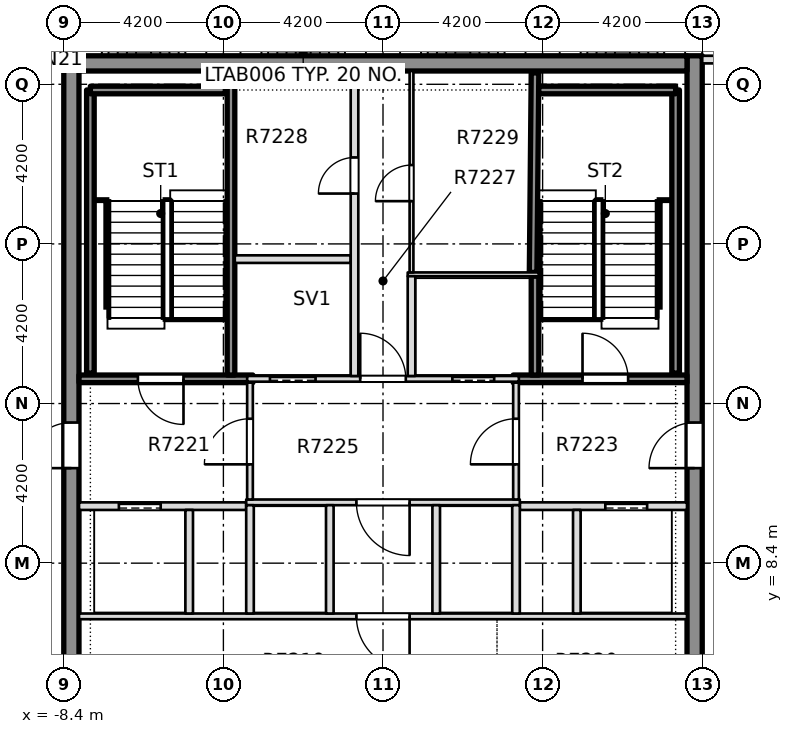
"""IFC4 building model, lengths in metres.
Left out: names, types, materials, properties, quantities, classifications, styles, units other than length and angle.
Written with IfcOpenShell. Run it as: python <this file> out.ifc"""

import sys

from ifc_helpers import new_model, si_unit, direction, frame, frame_2d, origin, place, context, subcontext, project, spatial, rectangle, extrude, element, fill, save


model = new_model("IFC4")
c1 = context("Model", 3, precision=1e-05, world=origin(), true_north=direction((0.0, 1.0)))
c2 = subcontext(c1, "Body", "Model", "MODEL_VIEW")
j1 = project(units=[si_unit("LENGTHUNIT", "METRE"), si_unit("PLANEANGLEUNIT", "RADIAN")], contexts=[c1])
p1 = place(None, origin())
s1 = spatial("IfcSite", under=j1, at=p1, CompositionType="ELEMENT")
p2 = place(p1, origin())
s2 = spatial("IfcBuilding", under=s1, at=p2, CompositionType="ELEMENT")
p3 = place(p2, frame((0.0, 0.0, 273.85)))
s3 = spatial("IfcBuildingStorey", under=s2, at=p3, CompositionType="ELEMENT", Elevation=273.85)
p4 = place(p3, frame((8.2, 4.2, -0.5), z_axis=(0.0, 0.0, 1.0), x_axis=(0.0, 1.0, 0.0)))
e1 = element("IfcWall", 1, at=p4, inside=s3, PredefinedType="SHEAR", context=c2, shape_type="SweptSolid", body=[
    extrude(rectangle(XDim=17.55, YDim=0.4, at=frame_2d((8.775, 0.0))), origin(), (0.0, 0.0, 1.0), 4.5),
])
p5 = place(p4, frame((6.7, 0.0, 0.5)))
e2 = element("IfcOpeningElement", 2, at=p5, cuts=e1, PredefinedType="OPENING", context=c2, shape_type="SweptSolid", body=[
    extrude(rectangle(XDim=1.2, YDim=2.1, at=frame_2d((0.6, 1.05))), frame((0.0, 0.21, 0.0), z_axis=(0.0, -1.0, 0.0), x_axis=(1.0, 0.0, 0.0)), (0.0, 0.0, 1.0), 0.42),
])
p6 = place(p3, frame((-8.2, 4.2, -0.5), z_axis=(0.0, 0.0, 1.0), x_axis=(0.0, 1.0, 0.0)))
e3 = element("IfcWall", 3, at=p6, inside=s3, PredefinedType="SHEAR", context=c2, shape_type="SweptSolid", body=[
    extrude(rectangle(XDim=17.55, YDim=0.4, at=frame_2d((8.775, 0.0))), origin(), (0.0, 0.0, 1.0), 4.5),
])
p7 = place(p6, frame((6.7, 0.0, 0.5)))
e4 = element("IfcOpeningElement", 4, at=p7, cuts=e3, PredefinedType="OPENING", context=c2, shape_type="SweptSolid", body=[
    extrude(rectangle(XDim=1.2, YDim=2.1, at=frame_2d((0.6, 1.05))), frame((0.0, 0.21, 0.0), z_axis=(0.0, -1.0, 0.0), x_axis=(1.0, 0.0, 0.0)), (0.0, 0.0, 1.0), 0.42),
])
p8 = place(p3, frame((-8.0, 21.55, -0.5), z_axis=(0.0, 0.0, 1.0), x_axis=(1.0, 0.0, 0.0)))
e5 = element("IfcWall", 5, at=p8, inside=s3, PredefinedType="SHEAR", context=c2, shape_type="SweptSolid", body=[
    extrude(rectangle(XDim=16.0, YDim=0.4, at=frame_2d((8.0, 0.0))), origin(), (0.0, 0.0, 1.0), 4.5),
])
for number, where, z_axis, x_axis in (
    (6, (9.6, 21.65, 0.0), (0.0, 0.0, 1.0), (-1.0, 0.0, 0.0)),
    (7, (-8.4, 21.65, 0.0), (0.0, 0.0, 1.0), (-1.0, 0.0, 0.0)),
):
    element("IfcWall", number, at=place(p3, frame(where, z_axis=z_axis, x_axis=x_axis)), inside=s3, PredefinedType="STANDARD", context=c2, shape_type="SweptSolid", body=[
        extrude(rectangle(XDim=1.2, YDim=0.2, at=frame_2d((0.6, 0.0))), origin(), (0.0, 0.0, 1.0), 4.0),
    ])
p9 = place(p3, frame((-7.999, 7.0, 0.0), z_axis=(0.0, 0.0, 1.0), x_axis=(1.0, 0.0, 0.0)))
e8 = element("IfcWall", 8, at=p9, inside=s3, PredefinedType="PARTITIONING", context=c2, shape_type="SweptSolid", body=[
    extrude(rectangle(XDim=15.998, YDim=0.15, at=frame_2d((7.999, 0.0))), origin(), (0.0, 0.0, 1.0), 4.0),
])
p10 = place(p9, frame((7.299, 0.0, 0.0)))
e9 = element("IfcOpeningElement", 9, at=p10, cuts=e8, PredefinedType="OPENING", context=c2, shape_type="SweptSolid", body=[
    extrude(rectangle(XDim=1.4, YDim=2.1, at=frame_2d((0.7, 1.05))), frame((0.0, 0.085, 0.0), z_axis=(0.0, -1.0, 0.0), x_axis=(1.0, 0.0, 0.0)), (0.0, 0.0, 1.0), 0.17),
])
p11 = place(p3, frame((-7.999, 9.9, 0.0), z_axis=(0.0, 0.0, 1.0), x_axis=(1.0, 0.0, 0.0)))
e10 = element("IfcWall", 10, at=p11, inside=s3, PredefinedType="PARTITIONING", context=c2, shape_type="SweptSolid", body=[
    extrude(rectangle(XDim=4.399, YDim=0.2, at=frame_2d((2.199, 0.0))), origin(), (0.0, 0.0, 1.0), 4.0),
])
p12 = place(p11, frame((1.049, 0.0, 0.0)))
e11 = element("IfcOpeningElement", 11, at=p12, cuts=e10, PredefinedType="OPENING", context=c2, shape_type="SweptSolid", body=[
    extrude(rectangle(XDim=1.1, YDim=2.1, at=frame_2d((0.55, 1.05))), frame((0.0, 0.11, 0.0), z_axis=(0.0, -1.0, 0.0), x_axis=(1.0, 0.0, 0.0)), (0.0, 0.0, 1.0), 0.22),
])
p13 = place(p3, frame((3.6, 9.9, 0.0), z_axis=(0.0, 0.0, 1.0), x_axis=(1.0, 0.0, 0.0)))
e12 = element("IfcWall", 12, at=p13, inside=s3, PredefinedType="PARTITIONING", context=c2, shape_type="SweptSolid", body=[
    extrude(rectangle(XDim=4.399, YDim=0.2, at=frame_2d((2.199, 0.0))), origin(), (0.0, 0.0, 1.0), 4.0),
])
p14 = place(p13, frame((2.25, 0.0, 0.0)))
e13 = element("IfcOpeningElement", 13, at=p14, cuts=e12, PredefinedType="OPENING", context=c2, shape_type="SweptSolid", body=[
    extrude(rectangle(XDim=1.1, YDim=2.1, at=frame_2d((0.55, 1.05))), frame((0.0, 0.11, 0.0), z_axis=(0.0, -1.0, 0.0), x_axis=(1.0, 0.0, 0.0)), (0.0, 0.0, 1.0), 0.22),
])
p15 = place(p3, frame((-3.6, 10.0, 0.0), z_axis=(0.0, 0.0, 1.0), x_axis=(1.0, 0.0, 0.0)))
e14 = element("IfcWall", 14, at=p15, inside=s3, PredefinedType="PARTITIONING", context=c2, shape_type="SweptSolid", body=[
    extrude(rectangle(XDim=7.2, YDim=0.15, at=frame_2d((3.6, 0.0))), origin(), (0.0, 0.0, 1.0), 4.0),
])
p16 = place(p15, frame((2.9, 0.0, 0.0)))
e15 = element("IfcOpeningElement", 15, at=p16, cuts=e14, PredefinedType="OPENING", context=c2, shape_type="SweptSolid", body=[
    extrude(rectangle(XDim=1.4, YDim=2.1, at=frame_2d((0.7, 1.05))), frame((0.0, 0.085, 0.0), z_axis=(0.0, -1.0, 0.0), x_axis=(1.0, 0.0, 0.0)), (0.0, 0.0, 1.0), 0.17),
])
p17 = place(p3, frame((-7.999, 13.25, 0.0), z_axis=(0.0, 0.0, 1.0), x_axis=(1.0, 0.0, 0.0)))
e16 = element("IfcWall", 16, at=p17, inside=s3, PredefinedType="SOLIDWALL", context=c2, shape_type="SweptSolid", body=[
    extrude(rectangle(XDim=4.574, YDim=0.2, at=frame_2d((2.287, 0.0))), origin(), (0.0, 0.0, 1.0), 4.0),
])
p18 = place(p17, frame((1.549, 0.0, 0.0)))
e17 = element("IfcOpeningElement", 17, at=p18, cuts=e16, PredefinedType="OPENING", context=c2, shape_type="SweptSolid", body=[
    extrude(rectangle(XDim=1.2, YDim=2.1, at=frame_2d((0.6, 1.05))), frame((0.0, 0.11, 0.0), z_axis=(0.0, -1.0, 0.0), x_axis=(1.0, 0.0, 0.0)), (0.0, 0.0, 1.0), 0.22),
])
p19 = place(p3, frame((-3.575, 13.25, 0.0), z_axis=(0.0, 0.0, 1.0), x_axis=(1.0, 0.0, 0.0)))
e18 = element("IfcWall", 18, at=p19, inside=s3, PredefinedType="PARTITIONING", context=c2, shape_type="SweptSolid", body=[
    extrude(rectangle(XDim=7.15, YDim=0.15, at=frame_2d((3.575, 0.0))), origin(), (0.0, 0.0, 1.0), 4.0),
])
p20 = place(p19, frame((0.6, 0.0, 0.0)))
e19 = element("IfcOpeningElement", 19, at=p20, cuts=e18, PredefinedType="OPENING", context=c2, shape_type="SweptSolid", body=[
    extrude(rectangle(XDim=1.2, YDim=2.1, at=frame_2d((0.6, 1.05))), frame((0.0, 0.085, 0.0), z_axis=(0.0, -1.0, 0.0), x_axis=(1.0, 0.0, 0.0)), (0.0, 0.0, 1.0), 0.17),
])
p21 = place(p19, frame((5.4, 0.0, 0.0)))
e20 = element("IfcOpeningElement", 20, at=p21, cuts=e18, PredefinedType="OPENING", context=c2, shape_type="SweptSolid", body=[
    extrude(rectangle(XDim=1.1, YDim=2.1, at=frame_2d((0.55, 1.05))), frame((0.0, 0.085, 0.0), z_axis=(0.0, -1.0, 0.0), x_axis=(1.0, 0.0, 0.0)), (0.0, 0.0, 1.0), 0.17),
])
p22 = place(p19, frame((2.975, 0.0, 0.0)))
e21 = element("IfcOpeningElement", 21, at=p22, cuts=e18, PredefinedType="OPENING", context=c2, shape_type="SweptSolid", body=[
    extrude(rectangle(XDim=1.2, YDim=2.1, at=frame_2d((0.6, 1.05))), frame((0.0, 0.085, 0.0), z_axis=(0.0, -1.0, 0.0), x_axis=(1.0, 0.0, 0.0)), (0.0, 0.0, 1.0), 0.17),
])
p23 = place(p3, frame((3.425, 13.25, 0.0), z_axis=(0.0, 0.0, 1.0), x_axis=(1.0, 0.0, 0.0)))
e22 = element("IfcWall", 22, at=p23, inside=s3, PredefinedType="SOLIDWALL", context=c2, shape_type="SweptSolid", body=[
    extrude(rectangle(XDim=4.574, YDim=0.2, at=frame_2d((2.287, 0.0))), origin(), (0.0, 0.0, 1.0), 4.0),
])
p24 = place(p23, frame((1.825, 0.0, 0.0)))
e23 = element("IfcOpeningElement", 23, at=p24, cuts=e22, PredefinedType="OPENING", context=c2, shape_type="SweptSolid", body=[
    extrude(rectangle(XDim=1.2, YDim=2.1, at=frame_2d((0.6, 1.05))), frame((0.0, 0.11, 0.0), z_axis=(0.0, -1.0, 0.0), x_axis=(1.0, 0.0, 0.0)), (0.0, 0.0, 1.0), 0.22),
])
p25 = place(p3, frame((0.65, 16.0, 0.0), z_axis=(0.0, 0.0, 1.0), x_axis=(1.0, 0.0, 0.0)))
e24 = element("IfcWall", 24, at=p25, inside=s3, PredefinedType="PARTITIONING", context=c2, shape_type="SweptSolid", body=[
    extrude(rectangle(XDim=3.45, YDim=0.1, at=frame_2d((1.725, 0.0))), origin(), (0.0, 0.0, 1.0), 4.0),
])
p26 = place(p3, frame((-3.9, 16.4, 0.0), z_axis=(0.0, 0.0, 1.0), x_axis=(1.0, 0.0, 0.0)))
e25 = element("IfcWall", 25, at=p26, inside=s3, PredefinedType="PARTITIONING", context=c2, shape_type="SweptSolid", body=[
    extrude(rectangle(XDim=3.05, YDim=0.2, at=frame_2d((1.525, 0.0))), origin(), (0.0, 0.0, 1.0), 4.0),
])
p27 = place(p3, frame((-5.1, 7.075, 0.0), z_axis=(0.0, 0.0, 1.0), x_axis=(0.0, 1.0, 0.0)))
e26 = element("IfcWall", 26, at=p27, inside=s3, PredefinedType="PARTITIONING", context=c2, shape_type="SweptSolid", body=[
    extrude(rectangle(XDim=2.725, YDim=0.2, at=frame_2d((1.363, 0.0))), origin(), (0.0, 0.0, 1.0), 4.0),
])
p28 = place(p3, frame((-4.0, 13.35, 0.0), z_axis=(0.0, 0.0, 1.0), x_axis=(0.0, 1.0, 0.0)))
e27 = element("IfcWall", 27, at=p28, inside=s3, PredefinedType="SOLIDWALL", context=c2, shape_type="SweptSolid", body=[
    extrude(rectangle(XDim=7.999, YDim=0.2, at=frame_2d((4.0, 0.0))), origin(), (0.0, 0.0, 1.0), 4.0),
])
p29 = place(p3, frame((-3.5, 7.075, 0.0), z_axis=(0.0, 0.0, 1.0), x_axis=(0.0, 1.0, 0.0)))
e28 = element("IfcWall", 28, at=p29, inside=s3, PredefinedType="PARTITIONING", context=c2, shape_type="SweptSolid", body=[
    extrude(rectangle(XDim=2.85, YDim=0.2, at=frame_2d((1.425, 0.0))), origin(), (0.0, 0.0, 1.0), 4.0),
])
p30 = place(p3, frame((-3.5, 10.075, 0.0), z_axis=(0.0, 0.0, 1.0), x_axis=(0.0, 1.0, 0.0)))
e29 = element("IfcWall", 29, at=p30, inside=s3, PredefinedType="PARTITIONING", context=c2, shape_type="SweptSolid", body=[
    extrude(rectangle(XDim=3.075, YDim=0.15, at=frame_2d((1.538, 0.0))), origin(), (0.0, 0.0, 1.0), 4.0),
])
p31 = place(p30, frame((0.925, 0.0, 0.0)))
e30 = element("IfcOpeningElement", 30, at=p31, cuts=e29, PredefinedType="OPENING", context=c2, shape_type="SweptSolid", body=[
    extrude(rectangle(XDim=1.2, YDim=2.1, at=frame_2d((0.6, 1.05))), frame((0.0, 0.085, 0.0), z_axis=(0.0, -1.0, 0.0), x_axis=(1.0, 0.0, 0.0)), (0.0, 0.0, 1.0), 0.17),
])
p32 = place(p3, frame((-1.4, 7.075, 0.0), z_axis=(0.0, 0.0, 1.0), x_axis=(0.0, 1.0, 0.0)))
e31 = element("IfcWall", 31, at=p32, inside=s3, PredefinedType="PARTITIONING", context=c2, shape_type="SweptSolid", body=[
    extrude(rectangle(XDim=2.85, YDim=0.2, at=frame_2d((1.425, 0.0))), origin(), (0.0, 0.0, 1.0), 4.0),
])
p33 = place(p3, frame((-0.75, 13.325, 0.0), z_axis=(0.0, 0.0, 1.0), x_axis=(0.0, 1.0, 0.0)))
e32 = element("IfcWall", 32, at=p33, inside=s3, PredefinedType="PARTITIONING", context=c2, shape_type="SweptSolid", body=[
    extrude(rectangle(XDim=8.024, YDim=0.2, at=frame_2d((4.012, 0.0))), origin(), (0.0, 0.0, 1.0), 4.0),
])
p34 = place(p33, frame((4.8, 0.0, 0.0)))
e33 = element("IfcOpeningElement", 33, at=p34, cuts=e32, PredefinedType="OPENING", context=c2, shape_type="SweptSolid", body=[
    extrude(rectangle(XDim=0.95, YDim=2.1, at=frame_2d((0.475, 1.05))), frame((0.0, 0.11, 0.0), z_axis=(0.0, -1.0, 0.0), x_axis=(1.0, 0.0, 0.0)), (0.0, 0.0, 1.0), 0.22),
])
p35 = place(p3, frame((0.75, 13.325, 0.0), z_axis=(0.0, 0.0, 1.0), x_axis=(0.0, 1.0, 0.0)))
e34 = element("IfcWall", 34, at=p35, inside=s3, PredefinedType="PARTITIONING", context=c2, shape_type="SweptSolid", body=[
    extrude(rectangle(XDim=2.625, YDim=0.2, at=frame_2d((1.312, 0.0))), origin(), (0.0, 0.0, 1.0), 4.0),
])
p36 = place(p3, frame((0.75, 16.05, 0.0), z_axis=(0.0, 0.0, 1.0), x_axis=(0.0, 1.0, 0.0)))
e35 = element("IfcWall", 35, at=p36, inside=s3, PredefinedType="PARTITIONING", context=c2, shape_type="SweptSolid", body=[
    extrude(rectangle(XDim=5.299, YDim=0.1, at=frame_2d((2.649, 0.0))), origin(), (0.0, 0.0, 1.0), 4.0),
])
p37 = place(p36, frame((1.875, 0.0, 0.0)))
e36 = element("IfcOpeningElement", 36, at=p37, cuts=e35, PredefinedType="OPENING", context=c2, shape_type="SweptSolid", body=[
    extrude(rectangle(XDim=0.95, YDim=2.1, at=frame_2d((0.475, 1.05))), frame((0.0, 0.06, 0.0), z_axis=(0.0, -1.0, 0.0), x_axis=(1.0, 0.0, 0.0)), (0.0, 0.0, 1.0), 0.12),
])
for number, where, z_axis, x_axis in (
    (37, (1.4, 7.075, 0.0), (0.0, 0.0, 1.0), (0.0, 1.0, 0.0)),
    (38, (3.5, 7.075, 0.0), (0.0, 0.0, 1.0), (0.0, 1.0, 0.0)),
):
    element("IfcWall", number, at=place(p3, frame(where, z_axis=z_axis, x_axis=x_axis)), inside=s3, PredefinedType="PARTITIONING", context=c2, shape_type="SweptSolid", body=[
        extrude(rectangle(XDim=2.85, YDim=0.2, at=frame_2d((1.425, 0.0))), origin(), (0.0, 0.0, 1.0), 4.0),
    ])
p38 = place(p3, frame((3.5, 10.075, 0.0), z_axis=(0.0, 0.0, 1.0), x_axis=(0.0, 1.0, 0.0)))
e39 = element("IfcWall", 39, at=p38, inside=s3, PredefinedType="PARTITIONING", context=c2, shape_type="SweptSolid", body=[
    extrude(rectangle(XDim=3.075, YDim=0.15, at=frame_2d((1.538, 0.0))), origin(), (0.0, 0.0, 1.0), 4.0),
])
p39 = place(p38, frame((0.925, 0.0, 0.0)))
e40 = element("IfcOpeningElement", 40, at=p39, cuts=e39, PredefinedType="OPENING", context=c2, shape_type="SweptSolid", body=[
    extrude(rectangle(XDim=1.2, YDim=2.1, at=frame_2d((0.6, 1.05))), frame((0.0, 0.085, 0.0), z_axis=(0.0, -1.0, 0.0), x_axis=(1.0, 0.0, 0.0)), (0.0, 0.0, 1.0), 0.17),
])
p40 = place(p3, frame((4.0, 13.35, 0.0), z_axis=(0.0, 0.0, 1.0), x_axis=(0.0, 1.0, 0.0)))
e41 = element("IfcWall", 41, at=p40, inside=s3, PredefinedType="SOLIDWALL", context=c2, shape_type="SweptSolid", body=[
    extrude(rectangle(XDim=2.6, YDim=0.2, at=frame_2d((1.3, 0.0))), origin(), (0.0, 0.0, 1.0), 4.0),
])
p41 = place(p3, frame((3.95, 16.05, 0.0), z_axis=(0.0, 0.0, 1.0), x_axis=(0.009534450323, 0.999954546095, 0.0)))
e42 = element("IfcWall", 42, at=p41, inside=s3, PredefinedType="SOLIDWALL", context=c2, shape_type="SweptSolid", body=[
    extrude(rectangle(XDim=5.249, YDim=0.2, at=frame_2d((2.625, 0.0))), origin(), (0.0, 0.0, 1.0), 4.0),
])
p42 = place(p3, frame((5.1, 7.075, 0.0), z_axis=(0.0, 0.0, 1.0), x_axis=(0.0, 1.0, 0.0)))
e43 = element("IfcWall", 43, at=p42, inside=s3, PredefinedType="PARTITIONING", context=c2, shape_type="SweptSolid", body=[
    extrude(rectangle(XDim=2.725, YDim=0.2, at=frame_2d((1.363, 0.0))), origin(), (0.0, 0.0, 1.0), 4.0),
])
p43 = place(p3, frame((-7.7, 13.4, 0.0), z_axis=(0.0, 0.0, 1.0), x_axis=(0.0, 1.0, 0.0)))
e44 = element("IfcWall", 44, at=p43, inside=s3, PredefinedType="SOLIDWALL", context=c2, shape_type="SweptSolid", body=[
    extrude(rectangle(XDim=7.45, YDim=0.2, at=frame_2d((3.725, 0.0))), origin(), (0.0, 0.0, 1.0), 4.0),
])
p44 = place(p3, frame((-7.7, 20.85, 0.0), z_axis=(0.0, 0.0, 1.0), x_axis=(1.0, 0.0, 0.0)))
e45 = element("IfcWall", 45, at=p44, inside=s3, PredefinedType="SOLIDWALL", context=c2, shape_type="SweptSolid", body=[
    extrude(rectangle(XDim=3.55, YDim=0.2, at=frame_2d((1.775, 0.0))), origin(), (0.0, 0.0, 1.0), 4.0),
])
p45 = place(p3, frame((7.7, 13.4, 0.0), z_axis=(0.0, 0.0, 1.0), x_axis=(0.0, 1.0, 0.0)))
e46 = element("IfcWall", 46, at=p45, inside=s3, PredefinedType="SOLIDWALL", context=c2, shape_type="SweptSolid", body=[
    extrude(rectangle(XDim=7.45, YDim=0.2, at=frame_2d((3.725, 0.0))), origin(), (0.0, 0.0, 1.0), 4.0),
])
p46 = place(p3, frame((4.1, 20.85, 0.0), z_axis=(0.0, 0.0, 1.0), x_axis=(1.0, 0.0, 0.0)))
e47 = element("IfcWall", 47, at=p46, inside=s3, PredefinedType="SOLIDWALL", context=c2, shape_type="SweptSolid", body=[
    extrude(rectangle(XDim=3.6, YDim=0.2, at=frame_2d((1.8, 0.0))), origin(), (0.0, 0.0, 1.0), 4.0),
])
p47 = place(p18, origin())
e48 = element("IfcDoor", 48, at=p47, inside=s3, OperationType="SINGLE_SWING_LEFT", PredefinedType="DOOR", context=c2, shape_type="SweptSolid", body=[
    extrude(rectangle(XDim=1.2, YDim=2.1, at=frame_2d((0.6, 1.05))), frame((0.0, 0.025, 0.0), z_axis=(0.0, -1.0, 0.0), x_axis=(1.0, 0.0, 0.0)), (0.0, 0.0, 1.0), 0.05),
])
fill(e17, e48)
p48 = place(p12, origin())
e49 = element("IfcDoor", 49, at=p48, inside=s3, OperationType="SLIDING_TO_LEFT", PredefinedType="DOOR", context=c2, shape_type="SweptSolid", body=[
    extrude(rectangle(XDim=1.1, YDim=2.1, at=frame_2d((0.55, 1.05))), frame((0.0, 0.025, 0.0), z_axis=(0.0, -1.0, 0.0), x_axis=(1.0, 0.0, 0.0)), (0.0, 0.0, 1.0), 0.05),
])
fill(e11, e49)
p49 = place(p24, origin())
e50 = element("IfcDoor", 50, at=p49, inside=s3, OperationType="SINGLE_SWING_RIGHT", PredefinedType="DOOR", context=c2, shape_type="SweptSolid", body=[
    extrude(rectangle(XDim=1.2, YDim=2.1, at=frame_2d((0.6, 1.05))), frame((0.0, 0.025, 0.0), z_axis=(0.0, -1.0, 0.0), x_axis=(1.0, 0.0, 0.0)), (0.0, 0.0, 1.0), 0.05),
])
fill(e23, e50)
p50 = place(p14, origin())
e51 = element("IfcDoor", 51, at=p50, inside=s3, OperationType="SLIDING_TO_LEFT", PredefinedType="DOOR", context=c2, shape_type="SweptSolid", body=[
    extrude(rectangle(XDim=1.1, YDim=2.1, at=frame_2d((0.55, 1.05))), frame((0.0, 0.025, 0.0), z_axis=(0.0, -1.0, 0.0), x_axis=(1.0, 0.0, 0.0)), (0.0, 0.0, 1.0), 0.05),
])
fill(e13, e51)
p51 = place(p10, origin())
e52 = element("IfcDoor", 52, at=p51, inside=s3, OperationType="SINGLE_SWING_RIGHT", PredefinedType="DOOR", context=c2, shape_type="SweptSolid", body=[
    extrude(rectangle(XDim=1.4, YDim=2.1, at=frame_2d((0.7, 1.05))), frame((0.0, 0.025, 0.0), z_axis=(0.0, -1.0, 0.0), x_axis=(1.0, 0.0, 0.0)), (0.0, 0.0, 1.0), 0.05),
])
fill(e9, e52)
p52 = place(p16, origin())
e53 = element("IfcDoor", 53, at=p52, inside=s3, OperationType="SINGLE_SWING_RIGHT", PredefinedType="DOOR", context=c2, shape_type="SweptSolid", body=[
    extrude(rectangle(XDim=1.4, YDim=2.1, at=frame_2d((0.7, 1.05))), frame((0.0, 0.025, 0.0), z_axis=(0.0, -1.0, 0.0), x_axis=(1.0, 0.0, 0.0)), (0.0, 0.0, 1.0), 0.05),
])
fill(e15, e53)
p53 = place(p20, origin())
e54 = element("IfcDoor", 54, at=p53, inside=s3, OperationType="SLIDING_TO_RIGHT", PredefinedType="DOOR", context=c2, shape_type="SweptSolid", body=[
    extrude(rectangle(XDim=1.2, YDim=2.1, at=frame_2d((0.6, 1.05))), frame((0.0, 0.025, 0.0), z_axis=(0.0, -1.0, 0.0), x_axis=(1.0, 0.0, 0.0)), (0.0, 0.0, 1.0), 0.05),
])
fill(e19, e54)
p54 = place(p21, origin())
e55 = element("IfcDoor", 55, at=p54, inside=s3, OperationType="SLIDING_TO_LEFT", PredefinedType="DOOR", context=c2, shape_type="SweptSolid", body=[
    extrude(rectangle(XDim=1.1, YDim=2.1, at=frame_2d((0.55, 1.05))), frame((0.0, 0.025, 0.0), z_axis=(0.0, -1.0, 0.0), x_axis=(1.0, 0.0, 0.0)), (0.0, 0.0, 1.0), 0.05),
])
fill(e20, e55)
p55 = place(p22, origin())
e56 = element("IfcDoor", 56, at=p55, inside=s3, OperationType="SINGLE_SWING_RIGHT", PredefinedType="DOOR", context=c2, shape_type="SweptSolid", body=[
    extrude(rectangle(XDim=1.2, YDim=2.1, at=frame_2d((0.6, 1.05))), frame((0.0, 0.025, 0.0), z_axis=(0.0, -1.0, 0.0), x_axis=(1.0, 0.0, 0.0)), (0.0, 0.0, 1.0), 0.05),
])
fill(e21, e56)
p56 = place(p34, origin())
e57 = element("IfcDoor", 57, at=p56, inside=s3, OperationType="SINGLE_SWING_RIGHT", PredefinedType="DOOR", context=c2, shape_type="SweptSolid", body=[
    extrude(rectangle(XDim=0.95, YDim=2.1, at=frame_2d((0.475, 1.05))), frame((0.0, 0.025, 0.0), z_axis=(0.0, -1.0, 0.0), x_axis=(1.0, 0.0, 0.0)), (0.0, 0.0, 1.0), 0.05),
])
fill(e33, e57)
p57 = place(p37, origin())
e58 = element("IfcDoor", 58, at=p57, inside=s3, OperationType="SINGLE_SWING_LEFT", PredefinedType="DOOR", context=c2, shape_type="SweptSolid", body=[
    extrude(rectangle(XDim=0.95, YDim=2.1, at=frame_2d((0.475, 1.05))), frame((0.0, 0.025, 0.0), z_axis=(0.0, -1.0, 0.0), x_axis=(1.0, 0.0, 0.0)), (0.0, 0.0, 1.0), 0.05),
])
fill(e36, e58)
p58 = place(p31, origin())
e59 = element("IfcDoor", 59, at=p58, inside=s3, OperationType="SINGLE_SWING_RIGHT", PredefinedType="DOOR", context=c2, shape_type="SweptSolid", body=[
    extrude(rectangle(XDim=1.2, YDim=2.1, at=frame_2d((0.6, 1.05))), frame((0.0, 0.025, 0.0), z_axis=(0.0, -1.0, 0.0), x_axis=(1.0, 0.0, 0.0)), (0.0, 0.0, 1.0), 0.05),
])
fill(e30, e59)
p59 = place(p39, origin())
e60 = element("IfcDoor", 60, at=p59, inside=s3, OperationType="SINGLE_SWING_LEFT", PredefinedType="DOOR", context=c2, shape_type="SweptSolid", body=[
    extrude(rectangle(XDim=1.2, YDim=2.1, at=frame_2d((0.6, 1.05))), frame((0.0, 0.025, 0.0), z_axis=(0.0, -1.0, 0.0), x_axis=(1.0, 0.0, 0.0)), (0.0, 0.0, 1.0), 0.05),
])
fill(e40, e60)
p60 = place(p7, origin())
e61 = element("IfcDoor", 61, at=p60, inside=s3, OperationType="SINGLE_SWING_LEFT", PredefinedType="DOOR", context=c2, shape_type="SweptSolid", body=[
    extrude(rectangle(XDim=1.2, YDim=2.1, at=frame_2d((0.6, 1.05))), frame((0.0, 0.025, 0.0), z_axis=(0.0, -1.0, 0.0), x_axis=(1.0, 0.0, 0.0)), (0.0, 0.0, 1.0), 0.05),
])
fill(e4, e61)
p61 = place(p5, origin())
e62 = element("IfcDoor", 62, at=p61, inside=s3, OperationType="SINGLE_SWING_LEFT", PredefinedType="DOOR", context=c2, shape_type="SweptSolid", body=[
    extrude(rectangle(XDim=1.2, YDim=2.1, at=frame_2d((0.6, 1.05))), frame((0.0, 0.025, 0.0), z_axis=(0.0, -1.0, 0.0), x_axis=(1.0, 0.0, 0.0)), (0.0, 0.0, 1.0), 0.05),
])
fill(e2, e62)
save(model, sys.argv[1])
